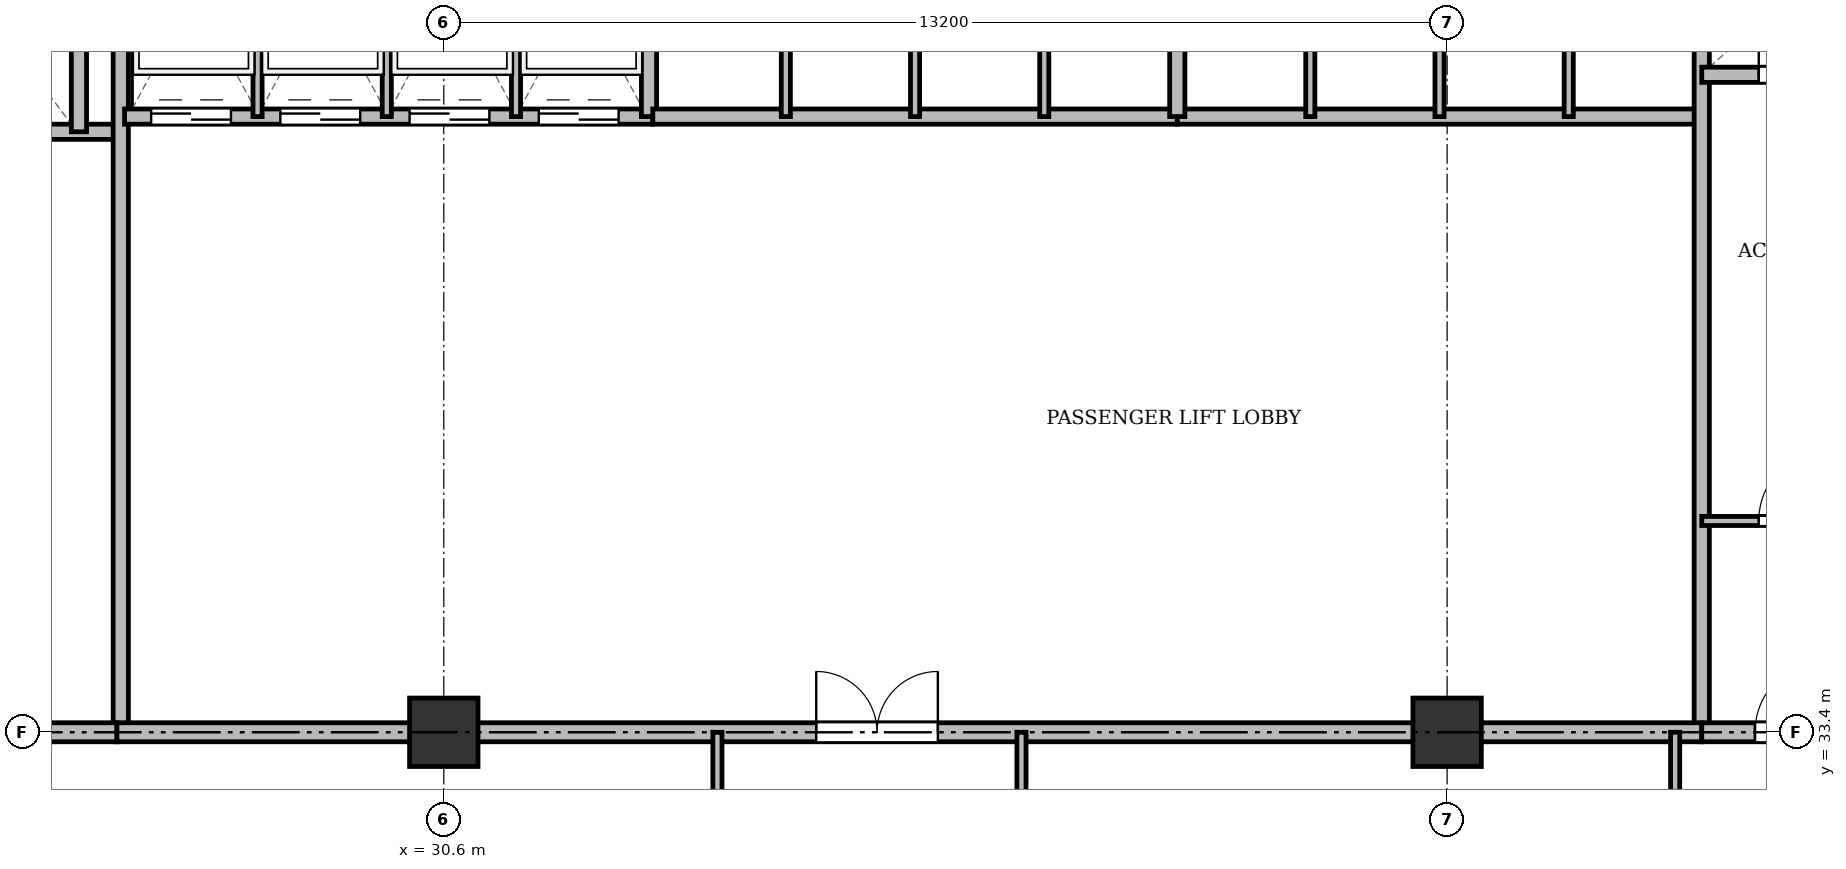
"""IFC4 building model, lengths in metres.
Left out: names, types, materials, properties, quantities, classifications, styles, units other than length and angle.
Written with IfcOpenShell. Run it as: python <this file> out.ifc"""

import sys

from ifc_helpers import new_model, si_unit, direction, frame, frame_2d, origin, origin_2d, place, context, subcontext, project, spatial, rectangle, extrude, source, transform, mapped, element, fill, save


model = new_model("IFC4")
c1 = context("Model", 3, precision=1e-05, world=origin(), true_north=direction((0.0, 1.0)))
c2 = subcontext(c1, "Body", "Model", "MODEL_VIEW")
j1 = project(units=[si_unit("LENGTHUNIT", "METRE"), si_unit("PLANEANGLEUNIT", "RADIAN")], contexts=[c1])
p1 = place(None, origin())
s1 = spatial("IfcSite", under=j1, at=p1, CompositionType="ELEMENT")
p2 = place(p1, origin())
s2 = spatial("IfcBuilding", under=s1, at=p2, CompositionType="ELEMENT")
p3 = place(p2, frame((0.0, 0.0, 45.1)))
s3 = spatial("IfcBuildingStorey", under=s2, at=p3, CompositionType="ELEMENT", Elevation=45.1)
m1 = source(origin(), c2, "Body", "SweptSolid", [
    extrude(rectangle(XDim=0.9, YDim=0.9, at=origin_2d()), origin(), (0.0, 0.0, 1.0), 3.6),
])
for number, where, z_axis, x_axis in (
    (1, (30.6, 33.4, 0.0), (0.0, 0.0, 1.0), (1.0, 0.0, 0.0)),
    (2, (43.8, 33.4, 0.0), (0.0, 0.0, 1.0), (1.0, 0.0, 0.0)),
):
    element("IfcColumn", number, at=place(p3, frame(where, z_axis=z_axis, x_axis=x_axis)), inside=s3, PredefinedType="COLUMN", context=c2, shape_type="MappedRepresentation", body=[
        mapped(m1, transform((0.0, 0.0, 0.0), x_axis=(1.0, 0.0, 0.0), y_axis=(0.0, 1.0, 0.0), z_axis=(0.0, 0.0, 1.0), scale=1.0)),
    ])
p4 = place(p3, frame((19.55, 41.3, 0.0), z_axis=(0.0, 0.0, 1.0), x_axis=(1.0, 0.0, 0.0)))
e3 = element("IfcWall", 3, at=p4, inside=s3, PredefinedType="SOLIDWALL", context=c2, shape_type="SweptSolid", body=[
    extrude(rectangle(XDim=6.75, YDim=0.2, at=frame_2d((3.375, 0.0))), origin(), (0.0, 0.0, 1.0), 3.34),
])
p5 = place(p4, frame((1.7, 0.0, 0.0)))
e4 = element("IfcOpeningElement", 4, at=p5, cuts=e3, PredefinedType="OPENING", context=c2, shape_type="SweptSolid", body=[
    extrude(rectangle(XDim=1.1, YDim=2.15, at=frame_2d((0.55, 1.075))), frame((0.0, 0.11, 0.0), z_axis=(0.0, -1.0, 0.0), x_axis=(1.0, 0.0, 0.0)), (0.0, 0.0, 1.0), 0.22),
])
p6 = place(p4, frame((4.4, 0.0, 0.0)))
e5 = element("IfcOpeningElement", 5, at=p6, cuts=e3, PredefinedType="OPENING", context=c2, shape_type="SweptSolid", body=[
    extrude(rectangle(XDim=1.1, YDim=2.15, at=frame_2d((0.55, 1.075))), frame((0.0, 0.11, 0.0), z_axis=(0.0, -1.0, 0.0), x_axis=(1.0, 0.0, 0.0)), (0.0, 0.0, 1.0), 0.22),
])
p7 = place(p3, frame((25.8, 41.3, 0.0), z_axis=(0.0, 0.0, 1.0), x_axis=(0.0, 1.0, 0.0)))
e6 = element("IfcWall", 6, at=p7, inside=s3, PredefinedType="SOLIDWALL", context=c2, shape_type="SweptSolid", body=[
    extrude(rectangle(XDim=3.4, YDim=0.2, at=frame_2d((1.7, 0.0))), origin(), (0.0, 0.0, 1.0), 3.34),
])
p8 = place(p3, frame((26.35, 33.4, 0.0), z_axis=(0.0, 0.0, 1.0), x_axis=(0.0, 1.0, 0.0)))
e7 = element("IfcWall", 7, at=p8, inside=s3, PredefinedType="SOLIDWALL", context=c2, shape_type="SweptSolid", body=[
    extrude(rectangle(XDim=11.3, YDim=0.2, at=frame_2d((5.65, 0.0))), origin(), (0.0, 0.0, 1.0), 2.69),
])
p9 = place(p3, frame((19.5, 33.4, 0.0), z_axis=(0.0, 0.0, 1.0), x_axis=(1.0, 0.0, 0.0)))
e8 = element("IfcWall", 8, at=p9, inside=s3, PredefinedType="PARTITIONING", context=c2, shape_type="SweptSolid", body=[
    extrude(rectangle(XDim=6.8, YDim=0.25, at=frame_2d((3.4, 0.0))), origin(), (0.0, 0.0, 1.0), 2.69),
])
p10 = place(p9, frame((0.75, 0.0, 0.0)))
e9 = element("IfcOpeningElement", 9, at=p10, cuts=e8, PredefinedType="OPENING", context=c2, shape_type="SweptSolid", body=[
    extrude(rectangle(XDim=1.6, YDim=2.2, at=frame_2d((0.8, 1.1))), frame((0.0, 0.135, 0.0), z_axis=(0.0, -1.0, 0.0), x_axis=(1.0, 0.0, 0.0)), (0.0, 0.0, 1.0), 0.27),
])
p11 = place(p3, frame((26.4, 41.5, 0.0), z_axis=(0.0, 0.0, 1.0), x_axis=(1.0, 0.0, 0.0)))
e10 = element("IfcWall", 10, at=p11, inside=s3, PredefinedType="SOLIDWALL", context=c2, shape_type="SweptSolid", body=[
    extrude(rectangle(XDim=6.95, YDim=0.2, at=frame_2d((3.475, 0.0))), origin(), (0.0, 0.0, 1.0), 3.34),
])
p12 = place(p11, frame((0.35, 0.0, 0.0)))
e11 = element("IfcOpeningElement", 11, at=p12, cuts=e10, PredefinedType="OPENING", context=c2, shape_type="SweptSolid", body=[
    extrude(rectangle(XDim=1.05, YDim=2.15, at=frame_2d((0.525, 1.075))), frame((0.0, 0.11, 0.0), z_axis=(0.0, -1.0, 0.0), x_axis=(1.0, 0.0, 0.0)), (0.0, 0.0, 1.0), 0.22),
])
p13 = place(p11, frame((2.05, 0.0, 0.0)))
e12 = element("IfcOpeningElement", 12, at=p13, cuts=e10, PredefinedType="OPENING", context=c2, shape_type="SweptSolid", body=[
    extrude(rectangle(XDim=1.05, YDim=2.15, at=frame_2d((0.525, 1.075))), frame((0.0, 0.11, 0.0), z_axis=(0.0, -1.0, 0.0), x_axis=(1.0, 0.0, 0.0)), (0.0, 0.0, 1.0), 0.22),
])
p14 = place(p11, frame((3.75, 0.0, 0.0)))
e13 = element("IfcOpeningElement", 13, at=p14, cuts=e10, PredefinedType="OPENING", context=c2, shape_type="SweptSolid", body=[
    extrude(rectangle(XDim=1.05, YDim=2.15, at=frame_2d((0.525, 1.075))), frame((0.0, 0.11, 0.0), z_axis=(0.0, -1.0, 0.0), x_axis=(1.0, 0.0, 0.0)), (0.0, 0.0, 1.0), 0.22),
])
p15 = place(p11, frame((5.45, 0.0, 0.0)))
e14 = element("IfcOpeningElement", 14, at=p15, cuts=e10, PredefinedType="OPENING", context=c2, shape_type="SweptSolid", body=[
    extrude(rectangle(XDim=1.05, YDim=2.15, at=frame_2d((0.525, 1.075))), frame((0.0, 0.11, 0.0), z_axis=(0.0, -1.0, 0.0), x_axis=(1.0, 0.0, 0.0)), (0.0, 0.0, 1.0), 0.22),
])
p16 = place(p3, frame((33.3, 41.5, 0.0), z_axis=(0.0, 0.0, 1.0), x_axis=(0.0, 1.0, 0.0)))
e15 = element("IfcWall", 15, at=p16, inside=s3, PredefinedType="SOLIDWALL", context=c2, shape_type="SweptSolid", body=[
    extrude(rectangle(XDim=3.2, YDim=0.2, at=frame_2d((1.6, 0.0))), origin(), (0.0, 0.0, 1.0), 3.34),
])
for number, where, z_axis, x_axis in (
    (16, (28.15, 41.5, 0.0), (0.0, 0.0, 1.0), (0.0, 1.0, 0.0)),
    (17, (29.85, 41.5, 0.0), (0.0, 0.0, 1.0), (0.0, 1.0, 0.0)),
    (18, (31.55, 41.5, 0.0), (0.0, 0.0, 1.0), (0.0, 1.0, 0.0)),
):
    element("IfcWall", number, at=place(p3, frame(where, z_axis=z_axis, x_axis=x_axis)), inside=s3, PredefinedType="PARTITIONING", context=c2, shape_type="SweptSolid", body=[
        extrude(rectangle(XDim=3.2, YDim=0.12, at=frame_2d((1.6, 0.0))), origin(), (0.0, 0.0, 1.0), 3.34),
    ])
p17 = place(p3, frame((33.35, 41.5, 0.0), z_axis=(0.0, 0.0, 1.0), x_axis=(1.0, 0.0, 0.0)))
e19 = element("IfcWall", 19, at=p17, inside=s3, PredefinedType="SOLIDWALL", context=c2, shape_type="SweptSolid", body=[
    extrude(rectangle(XDim=6.9, YDim=0.2, at=frame_2d((3.45, 0.0))), origin(), (0.0, 0.0, 1.0), 3.34),
])
for number, where, z_axis, x_axis in (
    (20, (35.1, 41.5, 0.0), (0.0, 0.0, 1.0), (0.0, 1.0, 0.0)),
    (21, (36.8, 41.5, 0.0), (0.0, 0.0, 1.0), (0.0, 1.0, 0.0)),
    (22, (38.5, 41.5, 0.0), (0.0, 0.0, 1.0), (0.0, 1.0, 0.0)),
):
    element("IfcWall", number, at=place(p3, frame(where, z_axis=z_axis, x_axis=x_axis)), inside=s3, PredefinedType="PARTITIONING", context=c2, shape_type="SweptSolid", body=[
        extrude(rectangle(XDim=3.2, YDim=0.12, at=frame_2d((1.6, 0.0))), origin(), (0.0, 0.0, 1.0), 3.34),
    ])
p18 = place(p3, frame((40.25, 41.5, 0.0), z_axis=(0.0, 0.0, 1.0), x_axis=(1.0, 0.0, 0.0)))
e23 = element("IfcWall", 23, at=p18, inside=s3, PredefinedType="SOLIDWALL", context=c2, shape_type="SweptSolid", body=[
    extrude(rectangle(XDim=6.9, YDim=0.2, at=frame_2d((3.45, 0.0))), origin(), (0.0, 0.0, 1.0), 2.752),
])
p19 = place(p3, frame((40.25, 41.5, 0.0), z_axis=(0.0, 0.0, 1.0), x_axis=(0.0, 1.0, 0.0)))
e24 = element("IfcWall", 24, at=p19, inside=s3, PredefinedType="SOLIDWALL", context=c2, shape_type="SweptSolid", body=[
    extrude(rectangle(XDim=3.2, YDim=0.2, at=frame_2d((1.6, 0.0))), origin(), (0.0, 0.0, 1.0), 3.34),
])
p20 = place(p3, frame((42.0, 41.5, 0.0), z_axis=(0.0, 0.0, 1.0), x_axis=(0.0, 1.0, 0.0)))
e25 = element("IfcWall", 25, at=p20, inside=s3, PredefinedType="PARTITIONING", context=c2, shape_type="SweptSolid", body=[
    extrude(rectangle(XDim=3.2, YDim=0.12, at=frame_2d((1.6, 0.0))), origin(), (0.0, 0.0, 1.0), 3.34),
])
p21 = place(p3, frame((43.7, 41.5, 0.0), z_axis=(0.0, 0.0, 1.0), x_axis=(0.0, 1.0, 0.0)))
e26 = element("IfcWall", 26, at=p21, inside=s3, PredefinedType="PARTITIONING", context=c2, shape_type="SweptSolid", body=[
    extrude(rectangle(XDim=3.2, YDim=0.12, at=frame_2d((1.6, 0.0))), origin(), (0.0, 0.0, 1.0), 2.752),
])
p22 = place(p3, frame((45.4, 41.5, 0.0), z_axis=(0.0, 0.0, 1.0), x_axis=(0.0, 1.0, 0.0)))
e27 = element("IfcWall", 27, at=p22, inside=s3, PredefinedType="PARTITIONING", context=c2, shape_type="SweptSolid", body=[
    extrude(rectangle(XDim=3.2, YDim=0.12, at=frame_2d((1.6, 0.0))), origin(), (0.0, 0.0, 1.0), 3.34),
])
p23 = place(p3, frame((47.15, 33.4, 0.0), z_axis=(0.0, 0.0, 1.0), x_axis=(0.0, 1.0, 0.0)))
e28 = element("IfcWall", 28, at=p23, inside=s3, PredefinedType="SOLIDWALL", context=c2, shape_type="SweptSolid", body=[
    extrude(rectangle(XDim=11.3, YDim=0.2, at=frame_2d((5.65, 0.0))), origin(), (0.0, 0.0, 1.0), 2.69),
])
p24 = place(p3, frame((26.3, 33.4, 0.0), z_axis=(0.0, 0.0, 1.0), x_axis=(1.0, 0.0, 0.0)))
e29 = element("IfcWall", 29, at=p24, inside=s3, PredefinedType="PARTITIONING", context=c2, shape_type="SweptSolid", body=[
    extrude(rectangle(XDim=20.85, YDim=0.25, at=frame_2d((10.425, 0.0))), origin(), (0.0, 0.0, 1.0), 2.69),
])
p25 = place(p24, frame((9.2, 0.0, 0.0)))
e30 = element("IfcOpeningElement", 30, at=p25, cuts=e29, PredefinedType="OPENING", context=c2, shape_type="SweptSolid", body=[
    extrude(rectangle(XDim=1.6, YDim=2.2, at=frame_2d((0.8, 1.1))), frame((0.0, 0.135, 0.0), z_axis=(0.0, -1.0, 0.0), x_axis=(1.0, 0.0, 0.0)), (0.0, 0.0, 1.0), 0.27),
])
p26 = place(p3, frame((47.15, 42.05, 0.0), z_axis=(0.0, 0.0, 1.0), x_axis=(1.0, 0.0, 0.0)))
e31 = element("IfcWall", 31, at=p26, inside=s3, PredefinedType="SOLIDWALL", context=c2, shape_type="SweptSolid", body=[
    extrude(rectangle(XDim=7.85, YDim=0.2, at=frame_2d((3.925, 0.0))), origin(), (0.0, 0.0, 1.0), 2.752),
])
p27 = place(p26, frame((0.75, 0.0, 0.0)))
e32 = element("IfcOpeningElement", 32, at=p27, cuts=e31, PredefinedType="OPENING", context=c2, shape_type="SweptSolid", body=[
    extrude(rectangle(XDim=0.9, YDim=2.1, at=frame_2d((0.45, 1.05))), frame((0.0, 0.11, 0.0), z_axis=(0.0, -1.0, 0.0), x_axis=(1.0, 0.0, 0.0)), (0.0, 0.0, 1.0), 0.22),
])
p28 = place(p26, frame((3.85, 0.0, 0.0)))
e33 = element("IfcOpeningElement", 33, at=p28, cuts=e31, PredefinedType="OPENING", context=c2, shape_type="SweptSolid", body=[
    extrude(rectangle(XDim=0.9, YDim=2.1, at=frame_2d((0.45, 1.05))), frame((0.0, 0.11, 0.0), z_axis=(0.0, -1.0, 0.0), x_axis=(1.0, 0.0, 0.0)), (0.0, 0.0, 1.0), 0.22),
])
p29 = place(p3, frame((47.15, 36.18, 0.0), z_axis=(0.0, 0.0, 1.0), x_axis=(1.0, 0.0, 0.0)))
e34 = element("IfcWall", 34, at=p29, inside=s3, PredefinedType="PARTITIONING", context=c2, shape_type="SweptSolid", body=[
    extrude(rectangle(XDim=5.3, YDim=0.12, at=frame_2d((2.65, 0.0))), origin(), (0.0, 0.0, 1.0), 2.752),
])
p30 = place(p29, frame((0.75, 0.0, 0.0)))
e35 = element("IfcOpeningElement", 35, at=p30, cuts=e34, PredefinedType="OPENING", context=c2, shape_type="SweptSolid", body=[
    extrude(rectangle(XDim=0.95, YDim=2.15, at=frame_2d((0.475, 1.075))), frame((0.0, 0.07, 0.0), z_axis=(0.0, -1.0, 0.0), x_axis=(1.0, 0.0, 0.0)), (0.0, 0.0, 1.0), 0.14),
])
p31 = place(p29, frame((3.45, 0.0, 0.0)))
e36 = element("IfcOpeningElement", 36, at=p31, cuts=e34, PredefinedType="OPENING", context=c2, shape_type="SweptSolid", body=[
    extrude(rectangle(XDim=0.95, YDim=2.15, at=frame_2d((0.475, 1.075))), frame((0.0, 0.07, 0.0), z_axis=(0.0, -1.0, 0.0), x_axis=(1.0, 0.0, 0.0)), (0.0, 0.0, 1.0), 0.14),
])
p32 = place(p3, frame((47.15, 33.4, 0.0), z_axis=(0.0, 0.0, 1.0), x_axis=(1.0, 0.0, 0.0)))
e37 = element("IfcWall", 37, at=p32, inside=s3, PredefinedType="PARTITIONING", context=c2, shape_type="SweptSolid", body=[
    extrude(rectangle(XDim=11.15, YDim=0.25, at=frame_2d((5.575, 0.0))), origin(), (0.0, 0.0, 1.0), 2.69),
])
p33 = place(p32, frame((0.7, 0.0, 0.0)))
e38 = element("IfcOpeningElement", 38, at=p33, cuts=e37, PredefinedType="OPENING", context=c2, shape_type="SweptSolid", body=[
    extrude(rectangle(XDim=0.95, YDim=2.15, at=frame_2d((0.475, 1.075))), frame((0.0, 0.135, 0.0), z_axis=(0.0, -1.0, 0.0), x_axis=(1.0, 0.0, 0.0)), (0.0, 0.0, 1.0), 0.27),
])
p34 = place(p32, frame((6.0, 0.0, 0.0)))
e39 = element("IfcOpeningElement", 39, at=p34, cuts=e37, PredefinedType="OPENING", context=c2, shape_type="SweptSolid", body=[
    extrude(rectangle(XDim=1.2, YDim=2.15, at=frame_2d((0.6, 1.075))), frame((0.0, 0.135, 0.0), z_axis=(0.0, -1.0, 0.0), x_axis=(1.0, 0.0, 0.0)), (0.0, 0.0, 1.0), 0.27),
])
for number, where, z_axis, x_axis in (
    (40, (34.2, 29.8, 0.0), (0.0, 0.0, 1.0), (0.0, 1.0, 0.0)),
    (41, (38.2, 29.8, 0.0), (0.0, 0.0, 1.0), (0.0, 1.0, 0.0)),
    (42, (46.8, 29.8, 0.0), (0.0, 0.0, 1.0), (0.0, 1.0, 0.0)),
):
    element("IfcWall", number, at=place(p3, frame(where, z_axis=z_axis, x_axis=x_axis)), inside=s3, PredefinedType="PARTITIONING", context=c2, shape_type="SweptSolid", body=[
        extrude(rectangle(XDim=3.6, YDim=0.12, at=frame_2d((1.8, 0.0))), origin(), (0.0, 0.0, 1.0), 2.69),
    ])
m2 = source(origin(), c2, "Body", "SweptSolid", [
    extrude(rectangle(XDim=1.05, YDim=2.15, at=frame_2d((0.525, 1.075))), frame((0.0, 0.025, 0.0), z_axis=(0.0, -1.0, 0.0), x_axis=(1.0, 0.0, 0.0)), (0.0, 0.0, 1.0), 0.05),
])
p35 = place(p12, origin())
e43 = element("IfcDoor", 43, at=p35, inside=s3, OperationType="DOUBLE_DOOR_SLIDING", PredefinedType="DOOR", context=c2, shape_type="MappedRepresentation", body=[
    mapped(m2, transform((0.0, 0.0, 0.0), x_axis=(1.0, 0.0, 0.0), y_axis=(0.0, 1.0, 0.0), z_axis=(0.0, 0.0, 1.0), scale=1.0)),
])
fill(e11, e43)
p36 = place(p13, origin())
e44 = element("IfcDoor", 44, at=p36, inside=s3, OperationType="DOUBLE_DOOR_SLIDING", PredefinedType="DOOR", context=c2, shape_type="MappedRepresentation", body=[
    mapped(m2, transform((0.0, 0.0, 0.0), x_axis=(1.0, 0.0, 0.0), y_axis=(0.0, 1.0, 0.0), z_axis=(0.0, 0.0, 1.0), scale=1.0)),
])
fill(e12, e44)
p37 = place(p14, origin())
e45 = element("IfcDoor", 45, at=p37, inside=s3, OperationType="DOUBLE_DOOR_SLIDING", PredefinedType="DOOR", context=c2, shape_type="MappedRepresentation", body=[
    mapped(m2, transform((0.0, 0.0, 0.0), x_axis=(1.0, 0.0, 0.0), y_axis=(0.0, 1.0, 0.0), z_axis=(0.0, 0.0, 1.0), scale=1.0)),
])
fill(e13, e45)
p38 = place(p15, origin())
e46 = element("IfcDoor", 46, at=p38, inside=s3, OperationType="DOUBLE_DOOR_SLIDING", PredefinedType="DOOR", context=c2, shape_type="MappedRepresentation", body=[
    mapped(m2, transform((0.0, 0.0, 0.0), x_axis=(1.0, 0.0, 0.0), y_axis=(0.0, 1.0, 0.0), z_axis=(0.0, 0.0, 1.0), scale=1.0)),
])
fill(e14, e46)
m3 = source(origin(), c2, "Body", "SweptSolid", [
    extrude(rectangle(XDim=1.6, YDim=2.2, at=frame_2d((0.8, 1.1))), frame((0.0, 0.025, 0.0), z_axis=(0.0, -1.0, 0.0), x_axis=(1.0, 0.0, 0.0)), (0.0, 0.0, 1.0), 0.05),
])
p39 = place(p25, origin())
e47 = element("IfcDoor", 47, at=p39, inside=s3, OperationType="DOUBLE_DOOR_SINGLE_SWING", PredefinedType="DOOR", context=c2, shape_type="MappedRepresentation", body=[
    mapped(m3, transform((0.0, 0.0, 0.0), x_axis=(1.0, 0.0, 0.0), y_axis=(0.0, 1.0, 0.0), z_axis=(0.0, 0.0, 1.0), scale=1.0)),
])
fill(e30, e47)
m4 = source(origin(), c2, "Body", "SweptSolid", [
    extrude(rectangle(XDim=0.9, YDim=2.1, at=frame_2d((0.45, 1.05))), frame((0.0, 0.025, 0.0), z_axis=(0.0, -1.0, 0.0), x_axis=(1.0, 0.0, 0.0)), (0.0, 0.0, 1.0), 0.05),
])
p40 = place(p27, origin())
e48 = element("IfcDoor", 48, at=p40, inside=s3, OperationType="SINGLE_SWING_LEFT", PredefinedType="DOOR", context=c2, shape_type="MappedRepresentation", body=[
    mapped(m4, transform((0.0, 0.0, 0.0), x_axis=(1.0, 0.0, 0.0), y_axis=(0.0, 1.0, 0.0), z_axis=(0.0, 0.0, 1.0), scale=1.0)),
])
fill(e32, e48)
m5 = source(origin(), c2, "Body", "SweptSolid", [
    extrude(rectangle(XDim=0.95, YDim=2.15, at=frame_2d((0.475, 1.075))), frame((0.0, 0.025, 0.0), z_axis=(0.0, -1.0, 0.0), x_axis=(1.0, 0.0, 0.0)), (0.0, 0.0, 1.0), 0.05),
])
p41 = place(p30, origin())
e49 = element("IfcDoor", 49, at=p41, inside=s3, OperationType="SINGLE_SWING_RIGHT", PredefinedType="DOOR", context=c2, shape_type="MappedRepresentation", body=[
    mapped(m5, transform((0.0, 0.0, 0.0), x_axis=(1.0, 0.0, 0.0), y_axis=(0.0, 1.0, 0.0), z_axis=(0.0, 0.0, 1.0), scale=1.0)),
])
fill(e35, e49)
p42 = place(p33, origin())
e50 = element("IfcDoor", 50, at=p42, inside=s3, OperationType="SINGLE_SWING_RIGHT", PredefinedType="DOOR", context=c2, shape_type="MappedRepresentation", body=[
    mapped(m5, transform((0.0, 0.0, 0.0), x_axis=(1.0, 0.0, 0.0), y_axis=(0.0, 1.0, 0.0), z_axis=(0.0, 0.0, 1.0), scale=1.0)),
])
fill(e38, e50)
save(model, sys.argv[1])
